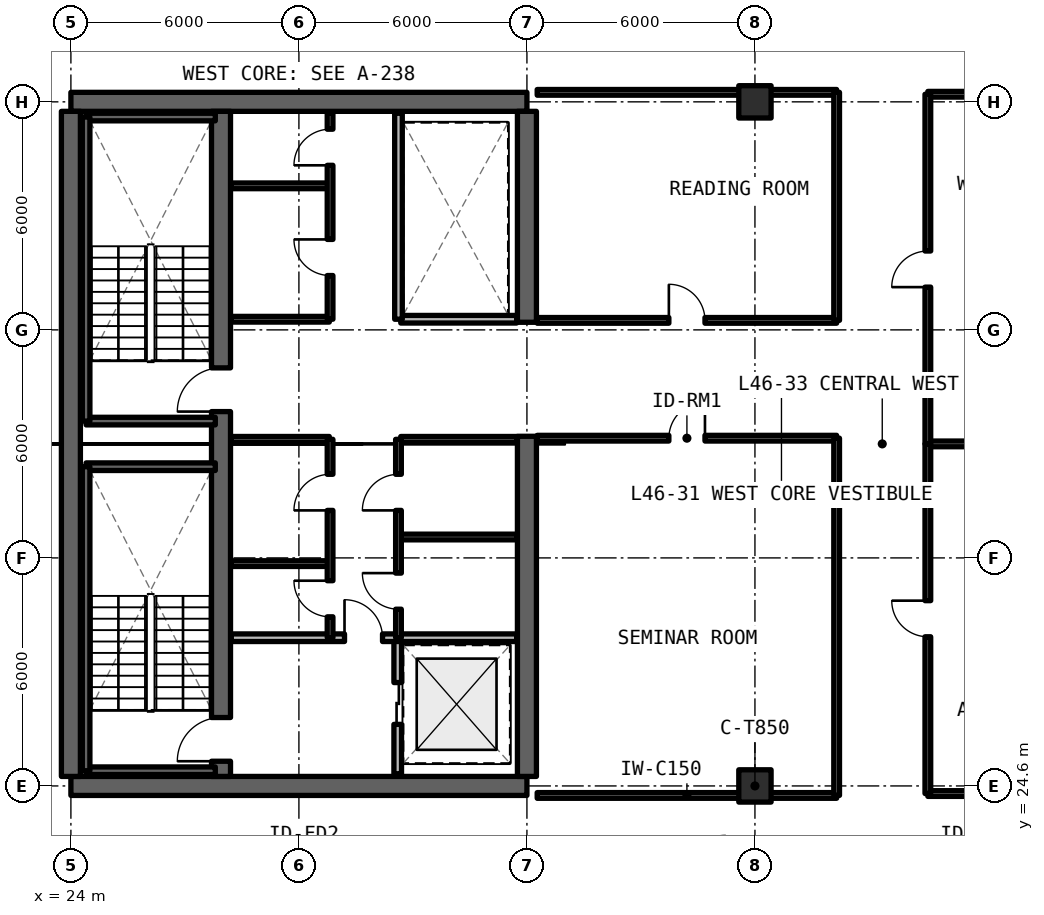
"""IFC4 building model, lengths in metres.
Left out: names, types, materials, properties, quantities, classifications, styles, units other than length and angle.
Written with IfcOpenShell. Run it as: python <this file> out.ifc"""

import sys

from ifc_helpers import new_model, si_unit, direction, frame, frame_2d, origin, origin_2d, place, context, subcontext, project, spatial, rectangle, extrude, element, fill, save


model = new_model("IFC4")
c1 = context("Model", 3, precision=1e-05, world=origin(), true_north=direction((0.0, 1.0)))
c2 = subcontext(c1, "Body", "Model", "MODEL_VIEW")
j1 = project(units=[si_unit("LENGTHUNIT", "METRE"), si_unit("PLANEANGLEUNIT", "RADIAN")], contexts=[c1])
p1 = place(None, origin())
s1 = spatial("IfcSite", under=j1, at=p1, CompositionType="ELEMENT")
p2 = place(p1, origin())
s2 = spatial("IfcBuilding", under=s1, at=p2, CompositionType="ELEMENT")
p3 = place(p2, frame((0.0, 0.0, 165.66)))
s3 = spatial("IfcBuildingStorey", under=s2, at=p3, CompositionType="ELEMENT", Elevation=165.66)
for number, where, z_axis, x_axis in (
    (1, (24.0, 24.6, 0.0), (0.0, 0.0, 1.0), (1.0, 0.0, 0.0)),
    (2, (36.0, 42.6, 0.0), (0.0, 0.0, 1.0), (-1.0, 0.0, 0.0)),
):
    element("IfcWall", number, at=place(p3, frame(where, z_axis=z_axis, x_axis=x_axis)), inside=s3, PredefinedType="SHEAR", context=c2, shape_type="SweptSolid", body=[
        extrude(rectangle(XDim=12.0, YDim=0.5, at=frame_2d((6.0, 0.0))), origin(), (0.0, 0.0, 1.0), 3.63),
    ])
p4 = place(p3, frame((24.0, 24.85, 0.0), z_axis=(0.0, 0.0, 1.0), x_axis=(0.0, 1.0, 0.0)))
e3 = element("IfcWall", 3, at=p4, inside=s3, PredefinedType="SHEAR", context=c2, shape_type="SweptSolid", body=[
    extrude(rectangle(XDim=17.5, YDim=0.5, at=frame_2d((8.75, 0.0))), origin(), (0.0, 0.0, 1.0), 3.63),
])
p5 = place(p3, frame((36.0, 24.85, 0.0), z_axis=(0.0, 0.0, 1.0), x_axis=(0.0, 1.0, 0.0)))
e4 = element("IfcWall", 4, at=p5, inside=s3, PredefinedType="SHEAR", context=c2, shape_type="SweptSolid", body=[
    extrude(rectangle(XDim=8.95, YDim=0.5, at=frame_2d((4.475, 0.0))), origin(), (0.0, 0.0, 1.0), 3.63),
])
p6 = place(p3, frame((36.0, 36.8, 0.0), z_axis=(0.0, 0.0, 1.0), x_axis=(0.0, 1.0, 0.0)))
e5 = element("IfcWall", 5, at=p6, inside=s3, PredefinedType="SHEAR", context=c2, shape_type="SweptSolid", body=[
    extrude(rectangle(XDim=5.55, YDim=0.5, at=frame_2d((2.775, 0.0))), origin(), (0.0, 0.0, 1.0), 3.63),
])
p7 = place(p3, frame((27.95, 24.85, 0.0), z_axis=(0.0, 0.0, 1.0), x_axis=(0.0, 1.0, 0.0)))
e6 = element("IfcWall", 6, at=p7, inside=s3, PredefinedType="SHEAR", context=c2, shape_type="SweptSolid", body=[
    extrude(rectangle(XDim=17.5, YDim=0.5, at=frame_2d((8.75, 0.0))), origin(), (0.0, 0.0, 1.0), 3.63),
])
p8 = place(p7, frame((0.4, 0.0, 0.0)))
e7 = element("IfcOpeningElement", 7, at=p8, cuts=e6, PredefinedType="OPENING", context=c2, shape_type="SweptSolid", body=[
    extrude(rectangle(XDim=1.15, YDim=2.15, at=frame_2d((0.575, 1.075))), frame((0.0, 0.26, 0.0), z_axis=(0.0, -1.0, 0.0), x_axis=(1.0, 0.0, 0.0)), (0.0, 0.0, 1.0), 0.52),
])
p9 = place(p7, frame((9.6, 0.0, 0.0)))
e8 = element("IfcOpeningElement", 8, at=p9, cuts=e6, PredefinedType="OPENING", context=c2, shape_type="SweptSolid", body=[
    extrude(rectangle(XDim=1.15, YDim=2.15, at=frame_2d((0.575, 1.075))), frame((0.0, 0.26, 0.0), z_axis=(0.0, -1.0, 0.0), x_axis=(1.0, 0.0, 0.0)), (0.0, 0.0, 1.0), 0.52),
])
for number, where, z_axis, x_axis in (
    (9, (42.0, 24.6, 0.0), (0.0, 0.0, 1.0), (1.0, 0.0, 0.0)),
    (10, (42.0, 42.6, 0.0), (0.0, 0.0, 1.0), (1.0, 0.0, 0.0)),
):
    element("IfcColumn", number, at=place(p3, frame(where, z_axis=z_axis, x_axis=x_axis)), inside=s3, PredefinedType="COLUMN", context=c2, shape_type="SweptSolid", body=[
        extrude(rectangle(XDim=0.85, YDim=0.85, at=origin_2d()), origin(), (0.0, 0.0, 1.0), 3.63),
    ])
p10 = place(p3, frame((32.6, 24.92, 0.0), z_axis=(0.0, 0.0, 1.0), x_axis=(0.0, 1.0, 0.0)))
e11 = element("IfcWall", 11, at=p10, inside=s3, PredefinedType="SOLIDWALL", context=c2, shape_type="SweptSolid", body=[
    extrude(rectangle(XDim=3.58, YDim=0.2, at=frame_2d((1.79, 0.0))), origin(), (0.0, 0.0, 1.0), 2.63),
])
p11 = place(p10, frame((1.3, 0.0, 0.0)))
e12 = element("IfcOpeningElement", 12, at=p11, cuts=e11, PredefinedType="OPENING", context=c2, shape_type="SweptSolid", body=[
    extrude(rectangle(XDim=1.1, YDim=2.2, at=frame_2d((0.55, 1.1))), frame((0.0, 0.11, 0.0), z_axis=(0.0, -1.0, 0.0), x_axis=(1.0, 0.0, 0.0)), (0.0, 0.0, 1.0), 0.22),
])
p12 = place(p3, frame((28.22, 28.5, 0.0), z_axis=(0.0, 0.0, 1.0), x_axis=(1.0, 0.0, 0.0)))
e13 = element("IfcWall", 13, at=p12, inside=s3, PredefinedType="SOLIDWALL", context=c2, shape_type="SweptSolid", body=[
    extrude(rectangle(XDim=7.51, YDim=0.2, at=frame_2d((3.755, 0.0))), origin(), (0.0, 0.0, 1.0), 2.63),
])
p13 = place(p12, frame((2.98, 0.0, 0.0)))
e14 = element("IfcOpeningElement", 14, at=p13, cuts=e13, PredefinedType="OPENING", context=c2, shape_type="SweptSolid", body=[
    extrude(rectangle(XDim=1.0, YDim=2.15, at=frame_2d((0.5, 1.075))), frame((0.0, 0.11, 0.0), z_axis=(0.0, -1.0, 0.0), x_axis=(1.0, 0.0, 0.0)), (0.0, 0.0, 1.0), 0.22),
])
for number, where, z_axis, x_axis in (
    (15, (28.22, 30.45, 0.0), (0.0, 0.0, 1.0), (1.0, 0.0, 0.0)),
    (16, (28.22, 33.72, 0.0), (0.0, 0.0, 1.0), (1.0, 0.0, 0.0)),
):
    element("IfcWall", number, at=place(p3, frame(where, z_axis=z_axis, x_axis=x_axis)), inside=s3, PredefinedType="SOLIDWALL", context=c2, shape_type="SweptSolid", body=[
        extrude(rectangle(XDim=2.58, YDim=0.15, at=frame_2d((1.29, 0.0))), origin(), (0.0, 0.0, 1.0), 2.63),
    ])
p14 = place(p3, frame((30.82, 28.5, 0.0), z_axis=(0.0, 0.0, 1.0), x_axis=(0.0, 1.0, 0.0)))
e17 = element("IfcWall", 17, at=p14, inside=s3, PredefinedType="SOLIDWALL", context=c2, shape_type="SweptSolid", body=[
    extrude(rectangle(XDim=5.22, YDim=0.15, at=frame_2d((2.61, 0.0))), origin(), (0.0, 0.0, 1.0), 2.63),
])
p15 = place(p14, frame((0.55, 0.0, 0.0)))
e18 = element("IfcOpeningElement", 18, at=p15, cuts=e17, PredefinedType="OPENING", context=c2, shape_type="SweptSolid", body=[
    extrude(rectangle(XDim=0.95, YDim=2.15, at=frame_2d((0.475, 1.075))), frame((0.0, 0.085, 0.0), z_axis=(0.0, -1.0, 0.0), x_axis=(1.0, 0.0, 0.0)), (0.0, 0.0, 1.0), 0.17),
])
p16 = place(p14, frame((3.35, 0.0, 0.0)))
e19 = element("IfcOpeningElement", 19, at=p16, cuts=e17, PredefinedType="OPENING", context=c2, shape_type="SweptSolid", body=[
    extrude(rectangle(XDim=0.95, YDim=2.15, at=frame_2d((0.475, 1.075))), frame((0.0, 0.085, 0.0), z_axis=(0.0, -1.0, 0.0), x_axis=(1.0, 0.0, 0.0)), (0.0, 0.0, 1.0), 0.17),
])
for number, where, z_axis, x_axis in (
    (20, (32.68, 31.15, 0.0), (0.0, 0.0, 1.0), (1.0, 0.0, 0.0)),
    (21, (32.68, 33.72, 0.0), (0.0, 0.0, 1.0), (1.0, 0.0, 0.0)),
):
    element("IfcWall", number, at=place(p3, frame(where, z_axis=z_axis, x_axis=x_axis)), inside=s3, PredefinedType="SOLIDWALL", context=c2, shape_type="SweptSolid", body=[
        extrude(rectangle(XDim=3.05, YDim=0.15, at=frame_2d((1.525, 0.0))), origin(), (0.0, 0.0, 1.0), 2.63),
    ])
p17 = place(p3, frame((32.62, 28.5, 0.0), z_axis=(0.0, 0.0, 1.0), x_axis=(0.0, 1.0, 0.0)))
e22 = element("IfcWall", 22, at=p17, inside=s3, PredefinedType="SOLIDWALL", context=c2, shape_type="SweptSolid", body=[
    extrude(rectangle(XDim=5.22, YDim=0.15, at=frame_2d((2.61, 0.0))), origin(), (0.0, 0.0, 1.0), 2.63),
])
p18 = place(p17, frame((0.75, 0.0, 0.0)))
e23 = element("IfcOpeningElement", 23, at=p18, cuts=e22, PredefinedType="OPENING", context=c2, shape_type="SweptSolid", body=[
    extrude(rectangle(XDim=0.95, YDim=2.15, at=frame_2d((0.475, 1.075))), frame((0.0, 0.085, 0.0), z_axis=(0.0, -1.0, 0.0), x_axis=(1.0, 0.0, 0.0)), (0.0, 0.0, 1.0), 0.17),
])
p19 = place(p17, frame((3.35, 0.0, 0.0)))
e24 = element("IfcOpeningElement", 24, at=p19, cuts=e22, PredefinedType="OPENING", context=c2, shape_type="SweptSolid", body=[
    extrude(rectangle(XDim=0.95, YDim=2.15, at=frame_2d((0.475, 1.075))), frame((0.0, 0.085, 0.0), z_axis=(0.0, -1.0, 0.0), x_axis=(1.0, 0.0, 0.0)), (0.0, 0.0, 1.0), 0.17),
])
for number, where, z_axis, x_axis in (
    (25, (28.22, 36.88, 0.0), (0.0, 0.0, 1.0), (1.0, 0.0, 0.0)),
    (26, (28.22, 40.39, 0.0), (0.0, 0.0, 1.0), (1.0, 0.0, 0.0)),
):
    element("IfcWall", number, at=place(p3, frame(where, z_axis=z_axis, x_axis=x_axis)), inside=s3, PredefinedType="SOLIDWALL", context=c2, shape_type="SweptSolid", body=[
        extrude(rectangle(XDim=2.58, YDim=0.15, at=frame_2d((1.29, 0.0))), origin(), (0.0, 0.0, 1.0), 2.63),
    ])
p20 = place(p3, frame((30.82, 36.88, 0.0), z_axis=(0.0, 0.0, 1.0), x_axis=(0.0, 1.0, 0.0)))
e27 = element("IfcWall", 27, at=p20, inside=s3, PredefinedType="SOLIDWALL", context=c2, shape_type="SweptSolid", body=[
    extrude(rectangle(XDim=5.42, YDim=0.15, at=frame_2d((2.71, 0.0))), origin(), (0.0, 0.0, 1.0), 2.63),
])
p21 = place(p20, frame((1.15, 0.0, 0.0)))
e28 = element("IfcOpeningElement", 28, at=p21, cuts=e27, PredefinedType="OPENING", context=c2, shape_type="SweptSolid", body=[
    extrude(rectangle(XDim=0.95, YDim=2.15, at=frame_2d((0.475, 1.075))), frame((0.0, 0.085, 0.0), z_axis=(0.0, -1.0, 0.0), x_axis=(1.0, 0.0, 0.0)), (0.0, 0.0, 1.0), 0.17),
])
p22 = place(p20, frame((4.05, 0.0, 0.0)))
e29 = element("IfcOpeningElement", 29, at=p22, cuts=e27, PredefinedType="OPENING", context=c2, shape_type="SweptSolid", body=[
    extrude(rectangle(XDim=0.95, YDim=2.15, at=frame_2d((0.475, 1.075))), frame((0.0, 0.085, 0.0), z_axis=(0.0, -1.0, 0.0), x_axis=(1.0, 0.0, 0.0)), (0.0, 0.0, 1.0), 0.17),
])
p23 = place(p3, frame((32.68, 36.88, 0.0), z_axis=(0.0, 0.0, 1.0), x_axis=(1.0, 0.0, 0.0)))
e30 = element("IfcWall", 30, at=p23, inside=s3, PredefinedType="SOLIDWALL", context=c2, shape_type="SweptSolid", body=[
    extrude(rectangle(XDim=3.05, YDim=0.2, at=frame_2d((1.525, 0.0))), origin(), (0.0, 0.0, 1.0), 2.63),
])
p24 = place(p3, frame((32.62, 36.88, 0.0), z_axis=(0.0, 0.0, 1.0), x_axis=(0.0, 1.0, 0.0)))
e31 = element("IfcWall", 31, at=p24, inside=s3, PredefinedType="SOLIDWALL", context=c2, shape_type="SweptSolid", body=[
    extrude(rectangle(XDim=5.42, YDim=0.2, at=frame_2d((2.71, 0.0))), origin(), (0.0, 0.0, 1.0), 2.63),
])
p25 = place(p3, frame((36.27, 24.35, 0.0), z_axis=(0.0, 0.0, 1.0), x_axis=(1.0, 0.0, 0.0)))
e32 = element("IfcWall", 32, at=p25, inside=s3, PredefinedType="SOLIDWALL", context=c2, shape_type="SweptSolid", body=[
    extrude(rectangle(XDim=7.88, YDim=0.15, at=frame_2d((3.94, 0.0))), origin(), (0.0, 0.0, 1.0), 2.63),
])
p26 = place(p3, frame((36.27, 33.75, 0.0), z_axis=(0.0, 0.0, 1.0), x_axis=(1.0, 0.0, 0.0)))
e33 = element("IfcWall", 33, at=p26, inside=s3, PredefinedType="SOLIDWALL", context=c2, shape_type="SweptSolid", body=[
    extrude(rectangle(XDim=7.88, YDim=0.15, at=frame_2d((3.94, 0.0))), origin(), (0.0, 0.0, 1.0), 2.63),
])
p27 = place(p26, frame((3.465, 0.0, 0.0)))
e34 = element("IfcOpeningElement", 34, at=p27, cuts=e33, PredefinedType="OPENING", context=c2, shape_type="SweptSolid", body=[
    extrude(rectangle(XDim=0.95, YDim=2.15, at=frame_2d((0.475, 1.075))), frame((0.0, 0.085, 0.0), z_axis=(0.0, -1.0, 0.0), x_axis=(1.0, 0.0, 0.0)), (0.0, 0.0, 1.0), 0.17),
])
p28 = place(p3, frame((44.15, 24.35, 0.0), z_axis=(0.0, 0.0, 1.0), x_axis=(0.0, 1.0, 0.0)))
e35 = element("IfcWall", 35, at=p28, inside=s3, PredefinedType="SOLIDWALL", context=c2, shape_type="SweptSolid", body=[
    extrude(rectangle(XDim=9.4, YDim=0.15, at=frame_2d((4.7, 0.0))), origin(), (0.0, 0.0, 1.0), 2.63),
])
p29 = place(p3, frame((36.27, 36.85, 0.0), z_axis=(0.0, 0.0, 1.0), x_axis=(1.0, 0.0, 0.0)))
e36 = element("IfcWall", 36, at=p29, inside=s3, PredefinedType="SOLIDWALL", context=c2, shape_type="SweptSolid", body=[
    extrude(rectangle(XDim=7.88, YDim=0.15, at=frame_2d((3.94, 0.0))), origin(), (0.0, 0.0, 1.0), 2.63),
])
p30 = place(p29, frame((3.465, 0.0, 0.0)))
e37 = element("IfcOpeningElement", 37, at=p30, cuts=e36, PredefinedType="OPENING", context=c2, shape_type="SweptSolid", body=[
    extrude(rectangle(XDim=0.95, YDim=2.15, at=frame_2d((0.475, 1.075))), frame((0.0, 0.085, 0.0), z_axis=(0.0, -1.0, 0.0), x_axis=(1.0, 0.0, 0.0)), (0.0, 0.0, 1.0), 0.17),
])
p31 = place(p3, frame((36.27, 42.85, 0.0), z_axis=(0.0, 0.0, 1.0), x_axis=(1.0, 0.0, 0.0)))
e38 = element("IfcWall", 38, at=p31, inside=s3, PredefinedType="SOLIDWALL", context=c2, shape_type="SweptSolid", body=[
    extrude(rectangle(XDim=7.88, YDim=0.15, at=frame_2d((3.94, 0.0))), origin(), (0.0, 0.0, 1.0), 2.63),
])
p32 = place(p3, frame((44.15, 36.85, 0.0), z_axis=(0.0, 0.0, 1.0), x_axis=(0.0, 1.0, 0.0)))
e39 = element("IfcWall", 39, at=p32, inside=s3, PredefinedType="SOLIDWALL", context=c2, shape_type="SweptSolid", body=[
    extrude(rectangle(XDim=6.0, YDim=0.15, at=frame_2d((3.0, 0.0))), origin(), (0.0, 0.0, 1.0), 2.63),
])
for number, where, z_axis, x_axis in (
    (40, (46.55, 24.4, 0.0), (0.0, 0.0, 1.0), (1.0, 0.0, 0.0)),
    (41, (46.55, 33.6, 0.0), (0.0, 0.0, 1.0), (1.0, 0.0, 0.0)),
):
    element("IfcWall", number, at=place(p3, frame(where, z_axis=z_axis, x_axis=x_axis)), inside=s3, PredefinedType="SOLIDWALL", context=c2, shape_type="SweptSolid", body=[
        extrude(rectangle(XDim=4.05, YDim=0.15, at=frame_2d((2.025, 0.0))), origin(), (0.0, 0.0, 1.0), 2.63),
    ])
p33 = place(p3, frame((46.55, 24.4, 0.0), z_axis=(0.0, 0.0, 1.0), x_axis=(0.0, 1.0, 0.0)))
e42 = element("IfcWall", 42, at=p33, inside=s3, PredefinedType="SOLIDWALL", context=c2, shape_type="SweptSolid", body=[
    extrude(rectangle(XDim=9.2, YDim=0.15, at=frame_2d((4.6, 0.0))), origin(), (0.0, 0.0, 1.0), 2.63),
])
p34 = place(p33, frame((4.125, 0.0, 0.0)))
e43 = element("IfcOpeningElement", 43, at=p34, cuts=e42, PredefinedType="OPENING", context=c2, shape_type="SweptSolid", body=[
    extrude(rectangle(XDim=0.95, YDim=2.15, at=frame_2d((0.475, 1.075))), frame((0.0, 0.085, 0.0), z_axis=(0.0, -1.0, 0.0), x_axis=(1.0, 0.0, 0.0)), (0.0, 0.0, 1.0), 0.17),
])
p35 = place(p3, frame((46.55, 42.8, 0.0), z_axis=(0.0, 0.0, 1.0), x_axis=(1.0, 0.0, 0.0)))
e44 = element("IfcWall", 44, at=p35, inside=s3, PredefinedType="SOLIDWALL", context=c2, shape_type="SweptSolid", body=[
    extrude(rectangle(XDim=4.05, YDim=0.15, at=frame_2d((2.025, 0.0))), origin(), (0.0, 0.0, 1.0), 2.63),
])
p36 = place(p3, frame((46.55, 33.6, 0.0), z_axis=(0.0, 0.0, 1.0), x_axis=(0.0, 1.0, 0.0)))
e45 = element("IfcWall", 45, at=p36, inside=s3, PredefinedType="SOLIDWALL", context=c2, shape_type="SweptSolid", body=[
    extrude(rectangle(XDim=9.2, YDim=0.15, at=frame_2d((4.6, 0.0))), origin(), (0.0, 0.0, 1.0), 2.63),
])
p37 = place(p36, frame((4.125, 0.0, 0.0)))
e46 = element("IfcOpeningElement", 46, at=p37, cuts=e45, PredefinedType="OPENING", context=c2, shape_type="SweptSolid", body=[
    extrude(rectangle(XDim=0.95, YDim=2.15, at=frame_2d((0.475, 1.075))), frame((0.0, 0.085, 0.0), z_axis=(0.0, -1.0, 0.0), x_axis=(1.0, 0.0, 0.0)), (0.0, 0.0, 1.0), 0.17),
])
for number, where, z_axis, x_axis in (
    (47, (24.4, 25.0, 0.0), (0.0, 0.0, 1.0), (1.0, 0.0, 0.0)),
    (48, (27.8, 33.0, 0.0), (0.0, 0.0, 1.0), (-1.0, 0.0, 0.0)),
):
    element("IfcWall", number, at=place(p3, frame(where, z_axis=z_axis, x_axis=x_axis)), inside=s3, PredefinedType="SOLIDWALL", context=c2, shape_type="SweptSolid", body=[
        extrude(rectangle(XDim=3.4, YDim=0.2, at=frame_2d((1.7, 0.0))), origin(), (0.0, 0.0, 1.0), 3.63),
    ])
p38 = place(p3, frame((24.4, 33.0, 0.0), z_axis=(0.0, 0.0, 1.0), x_axis=(0.0, -1.0, 0.0)))
e49 = element("IfcWall", 49, at=p38, inside=s3, PredefinedType="SOLIDWALL", context=c2, shape_type="SweptSolid", body=[
    extrude(rectangle(XDim=8.0, YDim=0.2, at=frame_2d((4.0, 0.0))), origin(), (0.0, 0.0, 1.0), 3.63),
])
for number, where, z_axis, x_axis in (
    (50, (24.4, 34.2, 0.0), (0.0, 0.0, 1.0), (1.0, 0.0, 0.0)),
    (51, (27.8, 42.2, 0.0), (0.0, 0.0, 1.0), (-1.0, 0.0, 0.0)),
):
    element("IfcWall", number, at=place(p3, frame(where, z_axis=z_axis, x_axis=x_axis)), inside=s3, PredefinedType="SOLIDWALL", context=c2, shape_type="SweptSolid", body=[
        extrude(rectangle(XDim=3.4, YDim=0.2, at=frame_2d((1.7, 0.0))), origin(), (0.0, 0.0, 1.0), 3.63),
    ])
p39 = place(p3, frame((24.4, 42.2, 0.0), z_axis=(0.0, 0.0, 1.0), x_axis=(0.0, -1.0, 0.0)))
e52 = element("IfcWall", 52, at=p39, inside=s3, PredefinedType="SOLIDWALL", context=c2, shape_type="SweptSolid", body=[
    extrude(rectangle(XDim=8.0, YDim=0.2, at=frame_2d((4.0, 0.0))), origin(), (0.0, 0.0, 1.0), 3.63),
])
p40 = place(p11, origin())
e53 = element("IfcDoor", 53, at=p40, inside=s3, OperationType="SLIDING_TO_LEFT", PredefinedType="DOOR", context=c2, shape_type="SweptSolid", body=[
    extrude(rectangle(XDim=1.1, YDim=2.2, at=frame_2d((0.55, 1.1))), frame((0.0, 0.025, 0.0), z_axis=(0.0, -1.0, 0.0), x_axis=(1.0, 0.0, 0.0)), (0.0, 0.0, 1.0), 0.05),
])
fill(e12, e53)
p41 = place(p13, origin())
e54 = element("IfcDoor", 54, at=p41, inside=s3, OperationType="SINGLE_SWING_LEFT", PredefinedType="DOOR", context=c2, shape_type="SweptSolid", body=[
    extrude(rectangle(XDim=1.0, YDim=2.15, at=frame_2d((0.5, 1.075))), frame((0.0, 0.025, 0.0), z_axis=(0.0, -1.0, 0.0), x_axis=(1.0, 0.0, 0.0)), (0.0, 0.0, 1.0), 0.05),
])
fill(e14, e54)
p42 = place(p15, origin())
e55 = element("IfcDoor", 55, at=p42, inside=s3, OperationType="SINGLE_SWING_RIGHT", PredefinedType="DOOR", context=c2, shape_type="SweptSolid", body=[
    extrude(rectangle(XDim=0.95, YDim=2.15, at=frame_2d((0.475, 1.075))), frame((0.0, 0.025, 0.0), z_axis=(0.0, -1.0, 0.0), x_axis=(1.0, 0.0, 0.0)), (0.0, 0.0, 1.0), 0.05),
])
fill(e18, e55)
p43 = place(p16, origin())
e56 = element("IfcDoor", 56, at=p43, inside=s3, OperationType="SINGLE_SWING_LEFT", PredefinedType="DOOR", context=c2, shape_type="SweptSolid", body=[
    extrude(rectangle(XDim=0.95, YDim=2.15, at=frame_2d((0.475, 1.075))), frame((0.0, 0.025, 0.0), z_axis=(0.0, -1.0, 0.0), x_axis=(1.0, 0.0, 0.0)), (0.0, 0.0, 1.0), 0.05),
])
fill(e19, e56)
p44 = place(p18, origin())
e57 = element("IfcDoor", 57, at=p44, inside=s3, OperationType="SINGLE_SWING_RIGHT", PredefinedType="DOOR", context=c2, shape_type="SweptSolid", body=[
    extrude(rectangle(XDim=0.95, YDim=2.15, at=frame_2d((0.475, 1.075))), frame((0.0, 0.025, 0.0), z_axis=(0.0, -1.0, 0.0), x_axis=(1.0, 0.0, 0.0)), (0.0, 0.0, 1.0), 0.05),
])
fill(e23, e57)
p45 = place(p19, origin())
e58 = element("IfcDoor", 58, at=p45, inside=s3, OperationType="SINGLE_SWING_LEFT", PredefinedType="DOOR", context=c2, shape_type="SweptSolid", body=[
    extrude(rectangle(XDim=0.95, YDim=2.15, at=frame_2d((0.475, 1.075))), frame((0.0, 0.025, 0.0), z_axis=(0.0, -1.0, 0.0), x_axis=(1.0, 0.0, 0.0)), (0.0, 0.0, 1.0), 0.05),
])
fill(e24, e58)
p46 = place(p21, origin())
e59 = element("IfcDoor", 59, at=p46, inside=s3, OperationType="SINGLE_SWING_RIGHT", PredefinedType="DOOR", context=c2, shape_type="SweptSolid", body=[
    extrude(rectangle(XDim=0.95, YDim=2.15, at=frame_2d((0.475, 1.075))), frame((0.0, 0.025, 0.0), z_axis=(0.0, -1.0, 0.0), x_axis=(1.0, 0.0, 0.0)), (0.0, 0.0, 1.0), 0.05),
])
fill(e28, e59)
p47 = place(p22, origin())
e60 = element("IfcDoor", 60, at=p47, inside=s3, OperationType="SINGLE_SWING_LEFT", PredefinedType="DOOR", context=c2, shape_type="SweptSolid", body=[
    extrude(rectangle(XDim=0.95, YDim=2.15, at=frame_2d((0.475, 1.075))), frame((0.0, 0.025, 0.0), z_axis=(0.0, -1.0, 0.0), x_axis=(1.0, 0.0, 0.0)), (0.0, 0.0, 1.0), 0.05),
])
fill(e29, e60)
p48 = place(p27, origin())
e61 = element("IfcDoor", 61, at=p48, inside=s3, OperationType="SINGLE_SWING_RIGHT", PredefinedType="DOOR", context=c2, shape_type="SweptSolid", body=[
    extrude(rectangle(XDim=0.95, YDim=2.15, at=frame_2d((0.475, 1.075))), frame((0.0, 0.025, 0.0), z_axis=(0.0, -1.0, 0.0), x_axis=(1.0, 0.0, 0.0)), (0.0, 0.0, 1.0), 0.05),
])
fill(e34, e61)
p49 = place(p30, origin())
e62 = element("IfcDoor", 62, at=p49, inside=s3, OperationType="SINGLE_SWING_LEFT", PredefinedType="DOOR", context=c2, shape_type="SweptSolid", body=[
    extrude(rectangle(XDim=0.95, YDim=2.15, at=frame_2d((0.475, 1.075))), frame((0.0, 0.025, 0.0), z_axis=(0.0, -1.0, 0.0), x_axis=(1.0, 0.0, 0.0)), (0.0, 0.0, 1.0), 0.05),
])
fill(e37, e62)
p50 = place(p34, origin())
e63 = element("IfcDoor", 63, at=p50, inside=s3, OperationType="SINGLE_SWING_RIGHT", PredefinedType="DOOR", context=c2, shape_type="SweptSolid", body=[
    extrude(rectangle(XDim=0.95, YDim=2.15, at=frame_2d((0.475, 1.075))), frame((0.0, 0.025, 0.0), z_axis=(0.0, -1.0, 0.0), x_axis=(1.0, 0.0, 0.0)), (0.0, 0.0, 1.0), 0.05),
])
fill(e43, e63)
p51 = place(p37, origin())
e64 = element("IfcDoor", 64, at=p51, inside=s3, OperationType="SINGLE_SWING_LEFT", PredefinedType="DOOR", context=c2, shape_type="SweptSolid", body=[
    extrude(rectangle(XDim=0.95, YDim=2.15, at=frame_2d((0.475, 1.075))), frame((0.0, 0.025, 0.0), z_axis=(0.0, -1.0, 0.0), x_axis=(1.0, 0.0, 0.0)), (0.0, 0.0, 1.0), 0.05),
])
fill(e46, e64)
p52 = place(p8, origin())
e65 = element("IfcDoor", 65, at=p52, inside=s3, OperationType="SINGLE_SWING_RIGHT", PredefinedType="DOOR", context=c2, shape_type="SweptSolid", body=[
    extrude(rectangle(XDim=1.15, YDim=2.15, at=frame_2d((0.575, 1.075))), frame((0.0, 0.025, 0.0), z_axis=(0.0, -1.0, 0.0), x_axis=(1.0, 0.0, 0.0)), (0.0, 0.0, 1.0), 0.05),
])
fill(e7, e65)
p53 = place(p9, origin())
e66 = element("IfcDoor", 66, at=p53, inside=s3, OperationType="SINGLE_SWING_LEFT", PredefinedType="DOOR", context=c2, shape_type="SweptSolid", body=[
    extrude(rectangle(XDim=1.15, YDim=2.15, at=frame_2d((0.575, 1.075))), frame((0.0, 0.025, 0.0), z_axis=(0.0, -1.0, 0.0), x_axis=(1.0, 0.0, 0.0)), (0.0, 0.0, 1.0), 0.05),
])
fill(e8, e66)
save(model, sys.argv[1])
